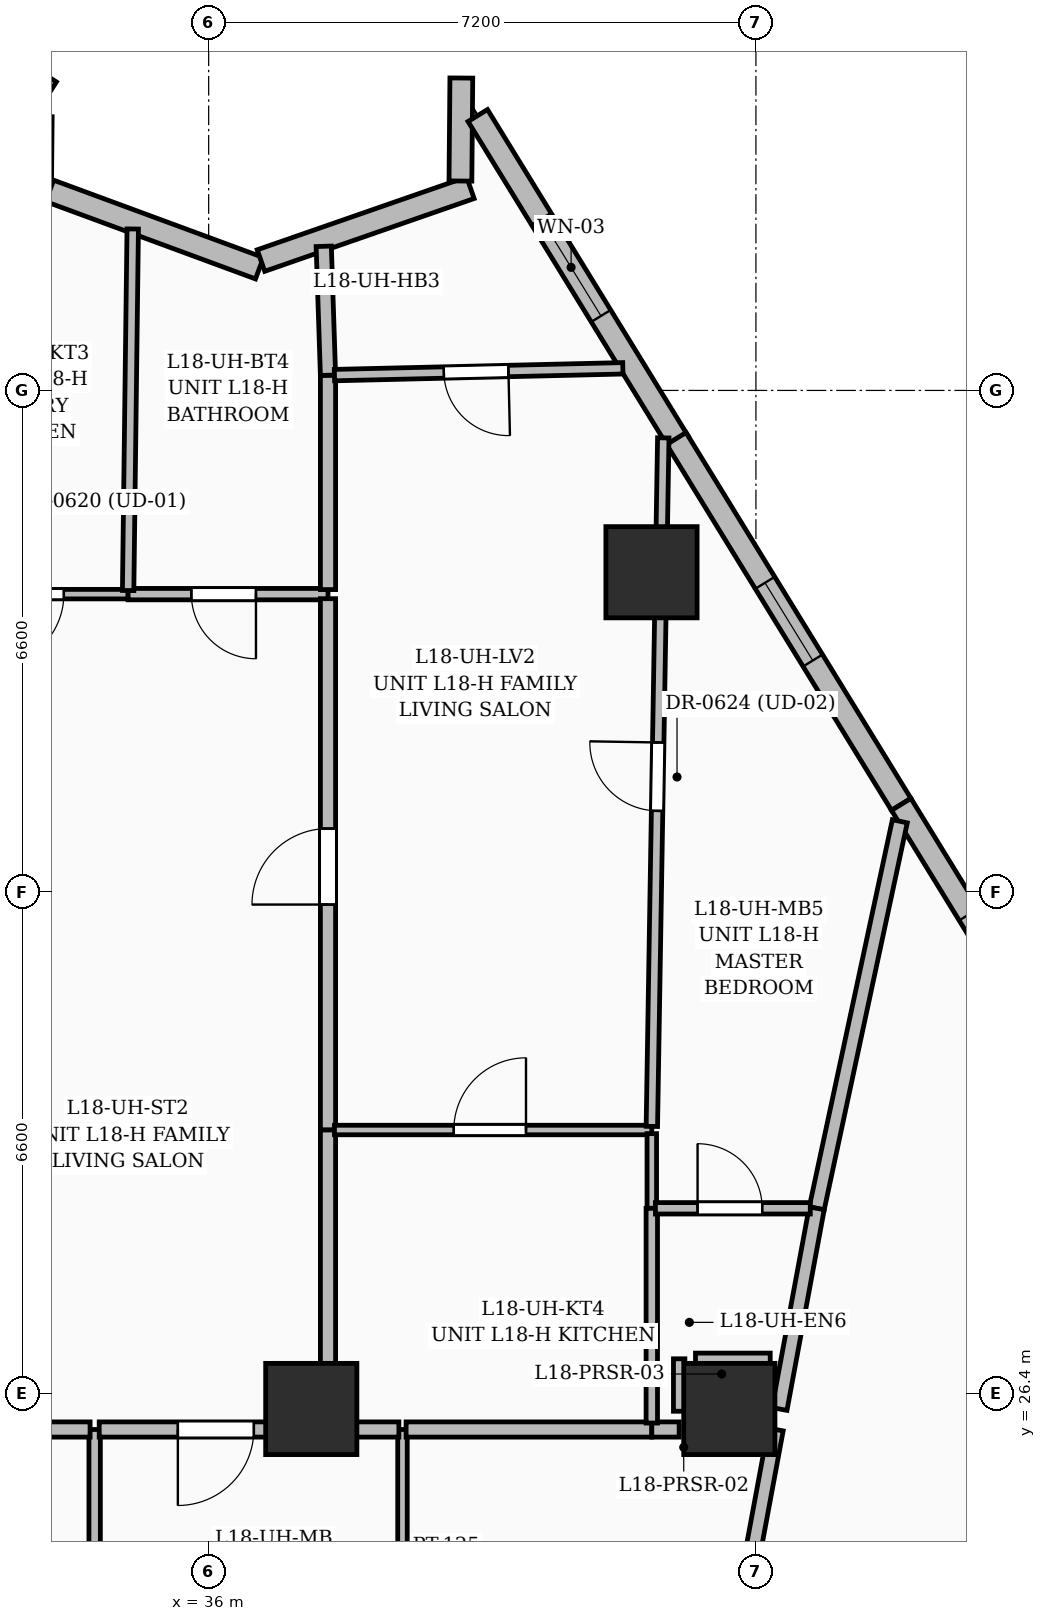
"""IFC4 building model, lengths in metres.
Left out: names, types, materials, properties, quantities, classifications, styles, units other than length and angle.
Written with IfcOpenShell. Run it as: python <this file> out.ifc"""

import sys

from ifc_helpers import new_model, si_unit, direction, frame, frame_2d, origin, origin_2d, place, context, subcontext, project, spatial, rectangle, extrude, element, fill, save


model = new_model("IFC4")
c1 = context("Model", 3, precision=1e-05, world=origin(), true_north=direction((0.0, 1.0)))
c2 = subcontext(c1, "Body", "Model", "MODEL_VIEW")
j1 = project(units=[si_unit("LENGTHUNIT", "METRE"), si_unit("PLANEANGLEUNIT", "RADIAN")], contexts=[c1])
p1 = place(None, origin())
s1 = spatial("IfcSite", under=j1, at=p1, CompositionType="ELEMENT")
p2 = place(p1, origin())
s2 = spatial("IfcBuilding", under=s1, at=p2, CompositionType="ELEMENT")
p3 = place(p2, frame((0.0, 0.0, 75.0)))
s3 = spatial("IfcBuildingStorey", under=s2, at=p3, CompositionType="ELEMENT", Elevation=75.0)
for number, where, z_axis, x_axis in (
    (1, (42.85, 26.2, 0.0), (0.0, 0.0, 1.0), (1.0, 0.0, 0.0)),
    (2, (37.35, 26.2, 0.0), (0.0, 0.0, 1.0), (1.0, 0.0, 0.0)),
    (3, (41.826, 37.208, 0.0), (0.0, 0.0, 1.0), (1.0, 0.0, 0.0)),
):
    element("IfcColumn", number, at=place(p3, frame(where, z_axis=z_axis, x_axis=x_axis)), inside=s3, PredefinedType="COLUMN", context=c2, shape_type="SweptSolid", body=[
        extrude(rectangle(XDim=1.2, YDim=1.2, at=origin_2d()), origin(), (0.0, 0.0, 1.0), 3.6),
    ])
p4 = place(p3, frame((29.524, 36.955, 0.0), z_axis=(0.0, 0.0, 1.0), x_axis=(0.539470626143, 0.842004420136, 0.0)))
e4 = element("IfcWall", 4, at=p4, inside=s3, PredefinedType="SOLIDWALL", context=c2, shape_type="SweptSolid", body=[
    extrude(rectangle(XDim=8.058, YDim=0.3, at=frame_2d((4.029, 0.0))), origin(), (0.0, 0.0, 1.0), 3.35),
])
p5 = place(p4, frame((1.55, 0.0, 0.8)))
e5 = element("IfcOpeningElement", 5, at=p5, cuts=e4, PredefinedType="OPENING", context=c2, shape_type="SweptSolid", body=[
    extrude(rectangle(XDim=1.2, YDim=1.8, at=frame_2d((0.6, 0.9))), frame((0.0, 0.16, 0.0), z_axis=(0.0, -1.0, 0.0), x_axis=(1.0, 0.0, 0.0)), (0.0, 0.0, 1.0), 0.32),
])
p6 = place(p3, frame((33.791, 43.202, 0.0), z_axis=(0.0, 0.0, 1.0), x_axis=(-0.009584224316, -0.999954070267, 0.0)))
e6 = element("IfcWall", 6, at=p6, inside=s3, PredefinedType="SOLIDWALL", context=c2, shape_type="SweptSolid", body=[
    extrude(rectangle(XDim=1.07, YDim=0.3, at=frame_2d((0.535, 0.0))), origin(), (0.0, 0.0, 1.0), 3.35),
])
p7 = place(p3, frame((33.909, 42.225, 0.0), z_axis=(0.0, 0.0, 1.0), x_axis=(0.938225446259, -0.346024582931, 0.0)))
e7 = element("IfcWall", 7, at=p7, inside=s3, PredefinedType="SOLIDWALL", context=c2, shape_type="SweptSolid", body=[
    extrude(rectangle(XDim=2.941, YDim=0.3, at=frame_2d((1.471, 0.0))), origin(), (0.0, 0.0, 1.0), 3.35),
])
p8 = place(p3, frame((36.688, 41.309, 0.0), z_axis=(0.0, 0.0, 1.0), x_axis=(0.944571305793, 0.328306332978, 0.0)))
e8 = element("IfcWall", 8, at=p8, inside=s3, PredefinedType="SOLIDWALL", context=c2, shape_type="SweptSolid", body=[
    extrude(rectangle(XDim=2.917, YDim=0.3, at=frame_2d((1.458, 0.0))), origin(), (0.0, 0.0, 1.0), 3.35),
])
p9 = place(p3, frame((39.312, 42.355, 0.0), z_axis=(0.0, 0.0, 1.0), x_axis=(0.008828484753, 0.999961028169, 0.0)))
e9 = element("IfcWall", 9, at=p9, inside=s3, PredefinedType="SOLIDWALL", context=c2, shape_type="SweptSolid", body=[
    extrude(rectangle(XDim=1.355, YDim=0.3, at=frame_2d((0.677, 0.0))), origin(), (0.0, 0.0, 1.0), 3.35),
])
p10 = place(p3, frame((39.54, 43.217, 0.0), z_axis=(0.0, 0.0, 1.0), x_axis=(0.52373802156, -0.851879383935, 0.0)))
e10 = element("IfcWall", 10, at=p10, inside=s3, PredefinedType="SOLIDWALL", context=c2, shape_type="SweptSolid", body=[
    extrude(rectangle(XDim=5.042, YDim=0.3, at=frame_2d((2.521, 0.0))), origin(), (0.0, 0.0, 1.0), 3.35),
])
p11 = place(p10, frame((1.595, 0.0, 0.6)))
e11 = element("IfcOpeningElement", 11, at=p11, cuts=e10, PredefinedType="OPENING", context=c2, shape_type="SweptSolid", body=[
    extrude(rectangle(XDim=1.5, YDim=2.1, at=frame_2d((0.75, 1.05))), frame((0.0, 0.16, 0.0), z_axis=(0.0, -1.0, 0.0), x_axis=(1.0, 0.0, 0.0)), (0.0, 0.0, 1.0), 0.32),
])
p12 = place(p3, frame((42.153, 38.967, 0.0), z_axis=(0.0, 0.0, 1.0), x_axis=(0.523687465278, -0.851910464022, 0.0)))
e12 = element("IfcWall", 12, at=p12, inside=s3, PredefinedType="SOLIDWALL", context=c2, shape_type="SweptSolid", body=[
    extrude(rectangle(XDim=5.649, YDim=0.3, at=frame_2d((2.825, 0.0))), origin(), (0.0, 0.0, 1.0), 3.35),
])
p13 = place(p12, frame((2.228, 0.0, 0.8)))
e13 = element("IfcOpeningElement", 13, at=p13, cuts=e12, PredefinedType="OPENING", context=c2, shape_type="SweptSolid", body=[
    extrude(rectangle(XDim=1.2, YDim=1.8, at=frame_2d((0.6, 0.9))), frame((0.0, 0.16, 0.0), z_axis=(0.0, -1.0, 0.0), x_axis=(1.0, 0.0, 0.0)), (0.0, 0.0, 1.0), 0.32),
])
p14 = place(p3, frame((45.111, 34.154, 0.0), z_axis=(0.0, 0.0, 1.0), x_axis=(0.523710369238, -0.851896384047, 0.0)))
e14 = element("IfcWall", 14, at=p14, inside=s3, PredefinedType="SOLIDWALL", context=c2, shape_type="SweptSolid", body=[
    extrude(rectangle(XDim=5.596, YDim=0.3, at=frame_2d((2.798, 0.0))), origin(), (0.0, 0.0, 1.0), 3.35),
])
p15 = place(p14, frame((1.7, 0.0, 0.6)))
e15 = element("IfcOpeningElement", 15, at=p15, cuts=e14, PredefinedType="OPENING", context=c2, shape_type="SweptSolid", body=[
    extrude(rectangle(XDim=2.4, YDim=2.1, at=frame_2d((1.2, 1.05))), frame((0.0, 0.16, 0.0), z_axis=(0.0, -1.0, 0.0), x_axis=(1.0, 0.0, 0.0)), (0.0, 0.0, 1.0), 0.32),
])
p16 = place(p3, frame((38.55, 25.93, 0.0), z_axis=(0.0, 0.0, 1.0), x_axis=(0.0, -1.0, 0.0)))
e16 = element("IfcWall", 16, at=p16, inside=s3, PredefinedType="PARTITIONING", context=c2, shape_type="SweptSolid", body=[
    extrude(rectangle(XDim=4.202, YDim=0.125, at=frame_2d((2.101, 0.0))), origin(), (0.0, 0.0, 1.0), 3.35),
])
p17 = place(p3, frame((41.956, 17.833, 0.0), z_axis=(0.0, 0.0, 1.0), x_axis=(0.182682671213, 0.98317192883, 0.0)))
e17 = element("IfcWall", 17, at=p17, inside=s3, PredefinedType="PARTITIONING", context=c2, shape_type="SweptSolid", body=[
    extrude(rectangle(XDim=8.235, YDim=0.2, at=frame_2d((4.118, 0.0))), origin(), (0.0, 0.0, 1.0), 2.309),
])
p18 = place(p3, frame((41.83, 25.93, 0.0), z_axis=(0.0, 0.0, 1.0), x_axis=(-1.0, 0.0, 0.0)))
e18 = element("IfcWall", 18, at=p18, inside=s3, PredefinedType="PARTITIONING", context=c2, shape_type="SweptSolid", body=[
    extrude(rectangle(XDim=3.233, YDim=0.2, at=frame_2d((1.616, 0.0))), origin(), (0.0, 0.0, 1.0), 2.309),
])
p19 = place(p3, frame((42.19, 25.93, 0.0), z_axis=(0.0, 0.0, 1.0), x_axis=(-1.0, 0.0, 0.0)))
e19 = element("IfcWall", 19, at=p19, inside=s3, PredefinedType="PARTITIONING", context=c2, shape_type="SweptSolid", body=[
    extrude(rectangle(XDim=0.36, YDim=0.2, at=frame_2d((0.18, 0.0))), origin(), (0.0, 0.0, 1.0), 2.309),
])
p20 = place(p3, frame((34.5, 25.93, 0.0), z_axis=(0.0, 0.0, 1.0), x_axis=(0.0, -1.0, 0.0)))
e20 = element("IfcWall", 20, at=p20, inside=s3, PredefinedType="PARTITIONING", context=c2, shape_type="SweptSolid", body=[
    extrude(rectangle(XDim=4.19, YDim=0.15, at=frame_2d((2.095, 0.0))), origin(), (0.0, 0.0, 1.0), 3.35),
])
p21 = place(p20, frame((1.758, 0.0, 0.0)))
e21 = element("IfcOpeningElement", 21, at=p21, cuts=e20, PredefinedType="OPENING", context=c2, shape_type="SweptSolid", body=[
    extrude(rectangle(XDim=0.85, YDim=2.1, at=frame_2d((0.425, 1.05))), frame((0.0, 0.085, 0.0), z_axis=(0.0, -1.0, 0.0), x_axis=(1.0, 0.0, 0.0)), (0.0, 0.0, 1.0), 0.17),
])
p22 = place(p3, frame((37.57, 25.93, 0.0), z_axis=(0.0, 0.0, 1.0), x_axis=(-1.0, 0.0, 0.0)))
e22 = element("IfcWall", 22, at=p22, inside=s3, PredefinedType="PARTITIONING", context=c2, shape_type="SweptSolid", body=[
    extrude(rectangle(XDim=3.01, YDim=0.2, at=frame_2d((1.505, 0.0))), origin(), (0.0, 0.0, 1.0), 3.35),
])
p23 = place(p22, frame((0.975, 0.0, 0.0)))
e23 = element("IfcOpeningElement", 23, at=p23, cuts=e22, PredefinedType="OPENING", context=c2, shape_type="SweptSolid", body=[
    extrude(rectangle(XDim=1.0, YDim=2.2, at=frame_2d((0.5, 1.1))), frame((0.0, 0.11, 0.0), z_axis=(0.0, -1.0, 0.0), x_axis=(1.0, 0.0, 0.0)), (0.0, 0.0, 1.0), 0.22),
])
p24 = place(p3, frame((38.502, 25.93, 0.0), z_axis=(0.0, 0.0, 1.0), x_axis=(-1.0, 0.0, 0.0)))
e24 = element("IfcWall", 24, at=p24, inside=s3, PredefinedType="PARTITIONING", context=c2, shape_type="SweptSolid", body=[
    extrude(rectangle(XDim=0.932, YDim=0.2, at=frame_2d((0.466, 0.0))), origin(), (0.0, 0.0, 1.0), 2.309),
])
p25 = place(p3, frame((34.44, 25.93, 0.0), z_axis=(0.0, 0.0, 1.0), x_axis=(-1.0, 0.0, 0.0)))
e25 = element("IfcWall", 25, at=p25, inside=s3, PredefinedType="PARTITIONING", context=c2, shape_type="SweptSolid", body=[
    extrude(rectangle(XDim=2.055, YDim=0.2, at=frame_2d((1.027, 0.0))), origin(), (0.0, 0.0, 1.0), 2.911),
])
p26 = place(p3, frame((45.093, 33.932, 0.0), z_axis=(0.0, 0.0, 1.0), x_axis=(-0.209881245986, -0.977726885476, 0.0)))
e26 = element("IfcWall", 26, at=p26, inside=s3, PredefinedType="PARTITIONING", context=c2, shape_type="SweptSolid", body=[
    extrude(rectangle(XDim=5.208, YDim=0.2, at=frame_2d((2.604, 0.0))), origin(), (0.0, 0.0, 1.0), 2.37),
])
p27 = place(p3, frame((44.0, 28.84, 0.0), z_axis=(0.0, 0.0, 1.0), x_axis=(-0.18247668152, -0.983210181345, 0.0)))
e27 = element("IfcWall", 27, at=p27, inside=s3, PredefinedType="PARTITIONING", context=c2, shape_type="SweptSolid", body=[
    extrude(rectangle(XDim=2.685, YDim=0.2, at=frame_2d((1.343, 0.0))), origin(), (0.0, 0.0, 1.0), 2.911),
])
p28 = place(p3, frame((34.94, 36.92, 0.0), z_axis=(0.0, 0.0, 1.0), x_axis=(-1.0, 0.0, 0.0)))
e28 = element("IfcWall", 28, at=p28, inside=s3, PredefinedType="PARTITIONING", context=c2, shape_type="SweptSolid", body=[
    extrude(rectangle(XDim=2.555, YDim=0.125, at=frame_2d((1.277, 0.0))), origin(), (0.0, 0.0, 1.0), 2.37),
])
p29 = place(p28, frame((0.845, 0.0, 0.0)))
e29 = element("IfcOpeningElement", 29, at=p29, cuts=e28, PredefinedType="OPENING", context=c2, shape_type="SweptSolid", body=[
    extrude(rectangle(XDim=0.95, YDim=2.2, at=frame_2d((0.475, 1.1))), frame((0.0, 0.072, 0.0), z_axis=(0.0, -1.0, 0.0), x_axis=(1.0, 0.0, 0.0)), (0.0, 0.0, 1.0), 0.145),
])
p30 = place(p3, frame((37.57, 36.92, 0.0), z_axis=(0.0, 0.0, 1.0), x_axis=(-1.0, 0.0, 0.0)))
e30 = element("IfcWall", 30, at=p30, inside=s3, PredefinedType="PARTITIONING", context=c2, shape_type="SweptSolid", body=[
    extrude(rectangle(XDim=2.63, YDim=0.15, at=frame_2d((1.315, 0.0))), origin(), (0.0, 0.0, 1.0), 2.37),
])
p31 = place(p30, frame((0.948, 0.0, 0.0)))
e31 = element("IfcOpeningElement", 31, at=p31, cuts=e30, PredefinedType="OPENING", context=c2, shape_type="SweptSolid", body=[
    extrude(rectangle(XDim=0.85, YDim=2.1, at=frame_2d((0.425, 1.05))), frame((0.0, 0.085, 0.0), z_axis=(0.0, -1.0, 0.0), x_axis=(1.0, 0.0, 0.0)), (0.0, 0.0, 1.0), 0.17),
])
p32 = place(p3, frame((37.57, 29.87, 0.0), z_axis=(0.0, 0.0, 1.0), x_axis=(0.0, 1.0, 0.0)))
e32 = element("IfcWall", 32, at=p32, inside=s3, PredefinedType="PARTITIONING", context=c2, shape_type="SweptSolid", body=[
    extrude(rectangle(XDim=6.99, YDim=0.2, at=frame_2d((3.495, 0.0))), origin(), (0.0, 0.0, 1.0), 2.37),
])
p33 = place(p32, frame((2.966, 0.0, 0.0)))
e33 = element("IfcOpeningElement", 33, at=p33, cuts=e32, PredefinedType="OPENING", context=c2, shape_type="SweptSolid", body=[
    extrude(rectangle(XDim=1.0, YDim=2.2, at=frame_2d((0.5, 1.1))), frame((0.0, 0.11, 0.0), z_axis=(0.0, -1.0, 0.0), x_axis=(1.0, 0.0, 0.0)), (0.0, 0.0, 1.0), 0.22),
])
p34 = place(p3, frame((37.57, 26.015, 0.0), z_axis=(0.0, 0.0, 1.0), x_axis=(0.0, 1.0, 0.0)))
e34 = element("IfcWall", 34, at=p34, inside=s3, PredefinedType="PARTITIONING", context=c2, shape_type="SweptSolid", body=[
    extrude(rectangle(XDim=3.855, YDim=0.2, at=frame_2d((1.928, 0.0))), origin(), (0.0, 0.0, 1.0), 2.911),
])
p35 = place(p3, frame((34.94, 36.968, 0.0), z_axis=(0.0, 0.0, 1.0), x_axis=(0.012728014725, 0.99991899554, 0.0)))
e35 = element("IfcWall", 35, at=p35, inside=s3, PredefinedType="PARTITIONING", context=c2, shape_type="SweptSolid", body=[
    extrude(rectangle(XDim=4.757, YDim=0.15, at=frame_2d((2.378, 0.0))), origin(), (0.0, 0.0, 1.0), 2.37),
])
p36 = place(p3, frame((37.57, 36.98, 0.0), z_axis=(0.0, 0.0, 1.0), x_axis=(0.0, 1.0, 0.0)))
e36 = element("IfcWall", 36, at=p36, inside=s3, PredefinedType="PARTITIONING", context=c2, shape_type="SweptSolid", body=[
    extrude(rectangle(XDim=2.82, YDim=0.2, at=frame_2d((1.41, 0.0))), origin(), (0.0, 0.0, 1.0), 2.37),
])
p37 = place(p3, frame((37.57, 39.8, 0.0), z_axis=(0.0, 0.0, 1.0), x_axis=(-0.033089686033, 0.999452386399, 0.0)))
e37 = element("IfcWall", 37, at=p37, inside=s3, PredefinedType="PARTITIONING", context=c2, shape_type="SweptSolid", body=[
    extrude(rectangle(XDim=1.697, YDim=0.2, at=frame_2d((0.849, 0.0))), origin(), (0.0, 0.0, 1.0), 3.35),
])
p38 = place(p3, frame((41.449, 39.891, 0.0), z_axis=(0.0, 0.0, 1.0), x_axis=(-0.999721247685, -0.02360989047, 0.0)))
e38 = element("IfcWall", 38, at=p38, inside=s3, PredefinedType="PARTITIONING", context=c2, shape_type="SweptSolid", body=[
    extrude(rectangle(XDim=3.795, YDim=0.15, at=frame_2d((1.897, 0.0))), origin(), (0.0, 0.0, 1.0), 3.35),
])
p39 = place(p38, frame((1.506, 0.0, 0.0)))
e39 = element("IfcOpeningElement", 39, at=p39, cuts=e38, PredefinedType="OPENING", context=c2, shape_type="SweptSolid", body=[
    extrude(rectangle(XDim=0.85, YDim=2.1, at=frame_2d((0.425, 1.05))), frame((0.0, 0.085, 0.0), z_axis=(0.0, -1.0, 0.0), x_axis=(1.0, 0.0, 0.0)), (0.0, 0.0, 1.0), 0.17),
])
p40 = place(p3, frame((37.655, 29.87, 0.0), z_axis=(0.0, 0.0, 1.0), x_axis=(1.0, 0.0, 0.0)))
e40 = element("IfcWall", 40, at=p40, inside=s3, PredefinedType="PARTITIONING", context=c2, shape_type="SweptSolid", body=[
    extrude(rectangle(XDim=4.175, YDim=0.125, at=frame_2d((2.087, 0.0))), origin(), (0.0, 0.0, 1.0), 3.35),
])
p41 = place(p40, frame((1.57, 0.0, 0.0)))
e41 = element("IfcOpeningElement", 41, at=p41, cuts=e40, PredefinedType="OPENING", context=c2, shape_type="SweptSolid", body=[
    extrude(rectangle(XDim=0.95, YDim=2.2, at=frame_2d((0.475, 1.1))), frame((0.0, 0.072, 0.0), z_axis=(0.0, -1.0, 0.0), x_axis=(1.0, 0.0, 0.0)), (0.0, 0.0, 1.0), 0.145),
])
p42 = place(p3, frame((41.831, 29.917, 0.0), z_axis=(0.0, 0.0, 1.0), x_axis=(0.016599696118, 0.999862215552, 0.0)))
e42 = element("IfcWall", 42, at=p42, inside=s3, PredefinedType="PARTITIONING", context=c2, shape_type="SweptSolid", body=[
    extrude(rectangle(XDim=9.06, YDim=0.15, at=frame_2d((4.53, 0.0))), origin(), (0.0, 0.0, 1.0), 2.345),
])
p43 = place(p42, frame((4.152, 0.0, 0.0)))
e43 = element("IfcOpeningElement", 43, at=p43, cuts=e42, PredefinedType="OPENING", context=c2, shape_type="SweptSolid", body=[
    extrude(rectangle(XDim=0.9, YDim=2.15, at=frame_2d((0.45, 1.075))), frame((0.0, 0.085, 0.0), z_axis=(0.0, -1.0, 0.0), x_axis=(1.0, 0.0, 0.0)), (0.0, 0.0, 1.0), 0.17),
])
p44 = place(p3, frame((41.83, 28.84, 0.0), z_axis=(0.0, 0.0, 1.0), x_axis=(0.0, 1.0, 0.0)))
e44 = element("IfcWall", 44, at=p44, inside=s3, PredefinedType="PARTITIONING", context=c2, shape_type="SweptSolid", body=[
    extrude(rectangle(XDim=0.982, YDim=0.125, at=frame_2d((0.491, 0.0))), origin(), (0.0, 0.0, 1.0), 2.911),
])
p45 = place(p3, frame((41.83, 26.015, 0.0), z_axis=(0.0, 0.0, 1.0), x_axis=(0.0, 1.0, 0.0)))
e45 = element("IfcWall", 45, at=p45, inside=s3, PredefinedType="PARTITIONING", context=c2, shape_type="SweptSolid", body=[
    extrude(rectangle(XDim=2.825, YDim=0.15, at=frame_2d((1.413, 0.0))), origin(), (0.0, 0.0, 1.0), 2.309),
])
p46 = place(p3, frame((41.877, 28.84, 0.0), z_axis=(0.0, 0.0, 1.0), x_axis=(1.0, 0.0, 0.0)))
e46 = element("IfcWall", 46, at=p46, inside=s3, PredefinedType="PARTITIONING", context=c2, shape_type="SweptSolid", body=[
    extrude(rectangle(XDim=2.038, YDim=0.15, at=frame_2d((1.019, 0.0))), origin(), (0.0, 0.0, 1.0), 2.345),
])
p47 = place(p46, frame((0.555, 0.0, 0.0)))
e47 = element("IfcOpeningElement", 47, at=p47, cuts=e46, PredefinedType="OPENING", context=c2, shape_type="SweptSolid", body=[
    extrude(rectangle(XDim=0.85, YDim=2.1, at=frame_2d((0.425, 1.05))), frame((0.0, 0.085, 0.0), z_axis=(0.0, -1.0, 0.0), x_axis=(1.0, 0.0, 0.0)), (0.0, 0.0, 1.0), 0.17),
])
p48 = place(p3, frame((42.19, 26.17, 0.0), z_axis=(0.0, 0.0, 1.0), x_axis=(0.0, 1.0, 0.0)))
e48 = element("IfcWall", 48, at=p48, inside=s3, PredefinedType="PARTITIONING", context=c2, shape_type="SweptSolid", body=[
    extrude(rectangle(XDim=0.69, YDim=0.15, at=frame_2d((0.345, 0.0))), origin(), (0.0, 0.0, 1.0), 2.309),
])
p49 = place(p3, frame((42.405, 26.86, 0.0), z_axis=(0.0, 0.0, 1.0), x_axis=(1.0, 0.0, 0.0)))
e49 = element("IfcWall", 49, at=p49, inside=s3, PredefinedType="PARTITIONING", context=c2, shape_type="SweptSolid", body=[
    extrude(rectangle(XDim=0.983, YDim=0.15, at=frame_2d((0.491, 0.0))), origin(), (0.0, 0.0, 1.0), 2.345),
])
p50 = place(p11, origin())
e50 = element("IfcWindow", 50, at=p50, inside=s3, PartitioningType="SINGLE_PANEL", PredefinedType="WINDOW", context=c2, shape_type="SweptSolid", body=[
    extrude(rectangle(XDim=1.5, YDim=2.1, at=frame_2d((0.75, 1.05))), frame((0.0, 0.03, 0.0), z_axis=(0.0, -1.0, 0.0), x_axis=(1.0, 0.0, 0.0)), (0.0, 0.0, 1.0), 0.06),
])
fill(e11, e50)
p51 = place(p13, origin())
e51 = element("IfcWindow", 51, at=p51, inside=s3, PartitioningType="SINGLE_PANEL", PredefinedType="WINDOW", context=c2, shape_type="SweptSolid", body=[
    extrude(rectangle(XDim=1.2, YDim=1.8, at=frame_2d((0.6, 0.9))), frame((0.0, 0.03, 0.0), z_axis=(0.0, -1.0, 0.0), x_axis=(1.0, 0.0, 0.0)), (0.0, 0.0, 1.0), 0.06),
])
fill(e13, e51)
p52 = place(p29, origin())
e52 = element("IfcDoor", 52, at=p52, inside=s3, OperationType="SINGLE_SWING_RIGHT", PredefinedType="DOOR", context=c2, shape_type="SweptSolid", body=[
    extrude(rectangle(XDim=0.95, YDim=2.2, at=frame_2d((0.475, 1.1))), frame((0.0, 0.025, 0.0), z_axis=(0.0, -1.0, 0.0), x_axis=(1.0, 0.0, 0.0)), (0.0, 0.0, 1.0), 0.05),
])
fill(e29, e52)
p53 = place(p31, origin())
e53 = element("IfcDoor", 53, at=p53, inside=s3, OperationType="SINGLE_SWING_LEFT", PredefinedType="DOOR", context=c2, shape_type="SweptSolid", body=[
    extrude(rectangle(XDim=0.85, YDim=2.1, at=frame_2d((0.425, 1.05))), frame((0.0, 0.025, 0.0), z_axis=(0.0, -1.0, 0.0), x_axis=(1.0, 0.0, 0.0)), (0.0, 0.0, 1.0), 0.05),
])
fill(e31, e53)
p54 = place(p41, origin())
e54 = element("IfcDoor", 54, at=p54, inside=s3, OperationType="SINGLE_SWING_RIGHT", PredefinedType="DOOR", context=c2, shape_type="SweptSolid", body=[
    extrude(rectangle(XDim=0.95, YDim=2.2, at=frame_2d((0.475, 1.1))), frame((0.0, 0.025, 0.0), z_axis=(0.0, -1.0, 0.0), x_axis=(1.0, 0.0, 0.0)), (0.0, 0.0, 1.0), 0.05),
])
fill(e41, e54)
p55 = place(p39, origin())
e55 = element("IfcDoor", 55, at=p55, inside=s3, OperationType="SINGLE_SWING_LEFT", PredefinedType="DOOR", context=c2, shape_type="SweptSolid", body=[
    extrude(rectangle(XDim=0.85, YDim=2.1, at=frame_2d((0.425, 1.05))), frame((0.0, 0.025, 0.0), z_axis=(0.0, -1.0, 0.0), x_axis=(1.0, 0.0, 0.0)), (0.0, 0.0, 1.0), 0.05),
])
fill(e39, e55)
p56 = place(p43, origin())
e56 = element("IfcDoor", 56, at=p56, inside=s3, OperationType="SINGLE_SWING_RIGHT", PredefinedType="DOOR", context=c2, shape_type="SweptSolid", body=[
    extrude(rectangle(XDim=0.9, YDim=2.15, at=frame_2d((0.45, 1.075))), frame((0.0, 0.025, 0.0), z_axis=(0.0, -1.0, 0.0), x_axis=(1.0, 0.0, 0.0)), (0.0, 0.0, 1.0), 0.05),
])
fill(e43, e56)
p57 = place(p47, origin())
e57 = element("IfcDoor", 57, at=p57, inside=s3, OperationType="SINGLE_SWING_LEFT", PredefinedType="DOOR", context=c2, shape_type="SweptSolid", body=[
    extrude(rectangle(XDim=0.85, YDim=2.1, at=frame_2d((0.425, 1.05))), frame((0.0, 0.025, 0.0), z_axis=(0.0, -1.0, 0.0), x_axis=(1.0, 0.0, 0.0)), (0.0, 0.0, 1.0), 0.05),
])
fill(e47, e57)
p58 = place(p23, origin())
e58 = element("IfcDoor", 58, at=p58, inside=s3, OperationType="SINGLE_SWING_RIGHT", PredefinedType="DOOR", context=c2, shape_type="SweptSolid", body=[
    extrude(rectangle(XDim=1.0, YDim=2.2, at=frame_2d((0.5, 1.1))), frame((0.0, 0.025, 0.0), z_axis=(0.0, -1.0, 0.0), x_axis=(1.0, 0.0, 0.0)), (0.0, 0.0, 1.0), 0.05),
])
fill(e23, e58)
p59 = place(p33, origin())
e59 = element("IfcDoor", 59, at=p59, inside=s3, OperationType="SINGLE_SWING_LEFT", PredefinedType="DOOR", context=c2, shape_type="SweptSolid", body=[
    extrude(rectangle(XDim=1.0, YDim=2.2, at=frame_2d((0.5, 1.1))), frame((0.0, 0.025, 0.0), z_axis=(0.0, -1.0, 0.0), x_axis=(1.0, 0.0, 0.0)), (0.0, 0.0, 1.0), 0.05),
])
fill(e33, e59)
save(model, sys.argv[1])
